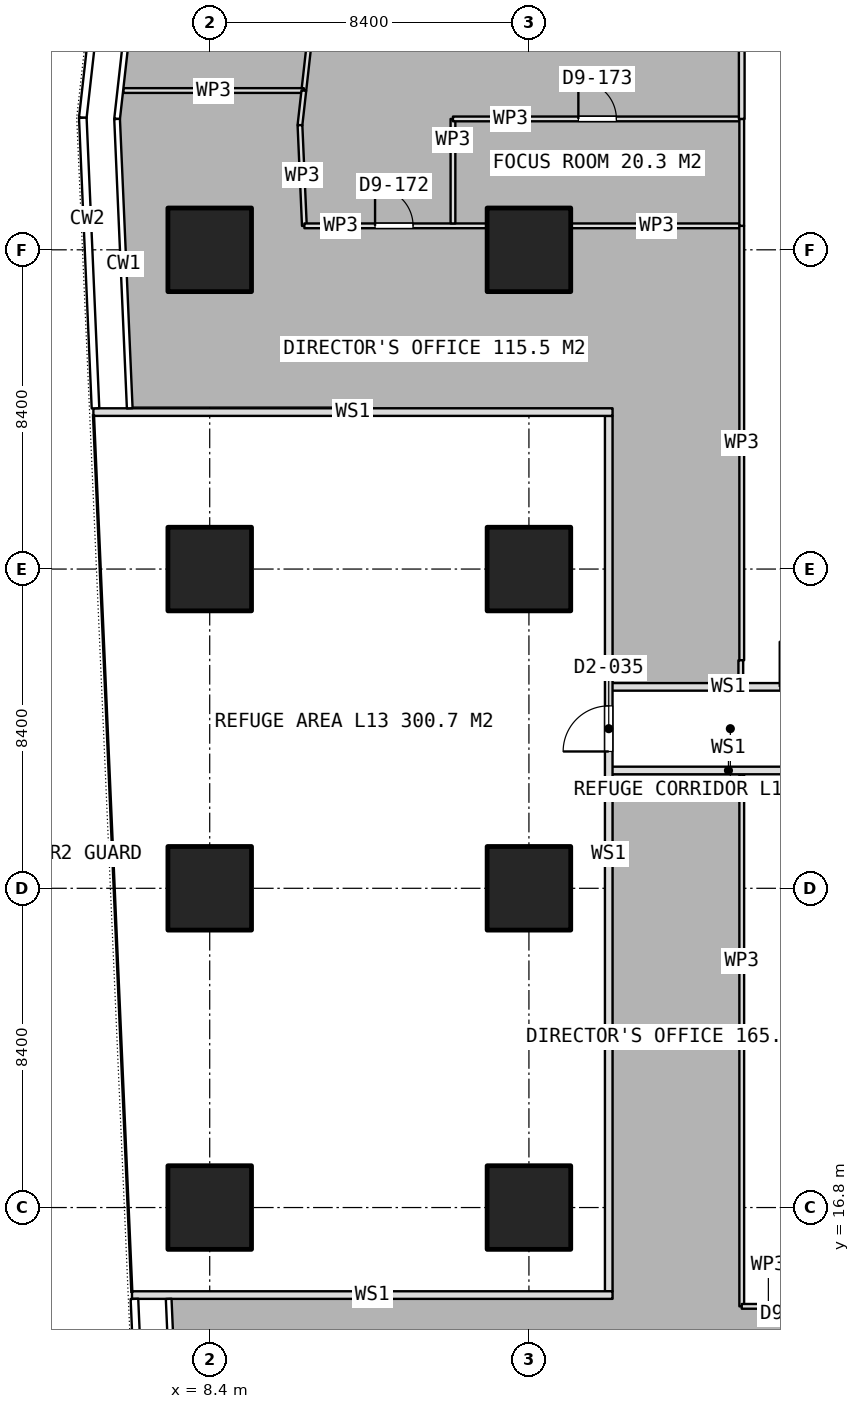
"""IFC4 building model, lengths in metres.
Left out: names, types, materials, properties, quantities, classifications, styles, units other than length and angle.
Written with IfcOpenShell. Run it as: python <this file> out.ifc"""

import sys

from ifc_helpers import new_model, si_unit, direction, frame, frame_2d, origin, origin_2d, place, context, subcontext, project, spatial, rectangle, extrude, element, fill, save


model = new_model("IFC4")
c1 = context("Model", 3, precision=1e-05, world=origin(), true_north=direction((0.0, 1.0)))
c2 = subcontext(c1, "Body", "Model", "MODEL_VIEW")
j1 = project(units=[si_unit("LENGTHUNIT", "METRE"), si_unit("PLANEANGLEUNIT", "RADIAN")], contexts=[c1])
p1 = place(None, origin())
s1 = spatial("IfcSite", under=j1, at=p1, CompositionType="ELEMENT")
p2 = place(p1, origin())
s2 = spatial("IfcBuilding", under=s1, at=p2, CompositionType="ELEMENT")
p3 = place(p2, frame((0.0, 0.0, 55.4)))
s3 = spatial("IfcBuildingStorey", under=s2, at=p3, CompositionType="ELEMENT", Elevation=55.4)
for number, where, z_axis, x_axis in (
    (1, (8.4, 16.8, 0.0), (0.0, 0.0, 1.0), (1.0, 0.0, 0.0)),
    (2, (8.4, 25.2, 0.0), (0.0, 0.0, 1.0), (1.0, 0.0, 0.0)),
    (3, (8.4, 33.6, 0.0), (0.0, 0.0, 1.0), (1.0, 0.0, 0.0)),
    (4, (8.4, 42.0, 0.0), (0.0, 0.0, 1.0), (1.0, 0.0, 0.0)),
    (5, (16.8, 16.8, 0.0), (0.0, 0.0, 1.0), (1.0, 0.0, 0.0)),
    (6, (16.8, 25.2, 0.0), (0.0, 0.0, 1.0), (1.0, 0.0, 0.0)),
    (7, (16.8, 33.6, 0.0), (0.0, 0.0, 1.0), (1.0, 0.0, 0.0)),
    (8, (16.8, 42.0, 0.0), (0.0, 0.0, 1.0), (1.0, 0.0, 0.0)),
):
    element("IfcColumn", number, at=place(p3, frame(where, z_axis=z_axis, x_axis=x_axis)), inside=s3, PredefinedType="COLUMN", context=c2, shape_type="SweptSolid", body=[
        extrude(rectangle(XDim=2.2, YDim=2.2, at=origin_2d()), origin(), (0.0, 0.0, 1.0), 3.75),
    ])
p4 = place(p3, frame((11.99, 56.096, 0.0), z_axis=(0.0, 0.0, 1.0), x_axis=(-0.111668088244, -0.993745560024, 0.0)))
e9 = element("IfcWall", 9, at=p4, inside=s3, PredefinedType="PARTITIONING", context=c2, shape_type="SweptSolid", body=[
    extrude(rectangle(XDim=9.967, YDim=0.125, at=frame_2d((4.984, 0.0))), origin(), (0.0, 0.0, 1.0), 3.5),
])
p5 = place(p4, frame((4.484, 0.0, 0.0)))
e10 = element("IfcOpeningElement", 10, at=p5, cuts=e9, PredefinedType="OPENING", context=c2, shape_type="SweptSolid", body=[
    extrude(rectangle(XDim=1.0, YDim=2.1, at=frame_2d((0.5, 1.05))), frame((0.0, 0.073, 0.0), z_axis=(0.0, -1.0, 0.0), x_axis=(1.0, 0.0, 0.0)), (0.0, 0.0, 1.0), 0.145),
])
p6 = place(p3, frame((10.877, 46.191, 0.0), z_axis=(0.0, 0.0, 1.0), x_axis=(-1.0, 0.0, 0.0)))
e11 = element("IfcWall", 11, at=p6, inside=s3, PredefinedType="PARTITIONING", context=c2, shape_type="SweptSolid", body=[
    extrude(rectangle(XDim=4.75, YDim=0.125, at=frame_2d((2.375, 0.0))), origin(), (0.0, 0.0, 1.0), 3.5),
])
p7 = place(p3, frame((10.877, 46.19, 0.0), z_axis=(0.0, 0.0, 1.0), x_axis=(-0.111455757416, -0.993769396862, 0.0)))
e12 = element("IfcWall", 12, at=p7, inside=s3, PredefinedType="PARTITIONING", context=c2, shape_type="SweptSolid", body=[
    extrude(rectangle(XDim=0.916, YDim=0.125, at=frame_2d((0.458, 0.0))), origin(), (0.0, 0.0, 1.0), 3.5),
])
p8 = place(p3, frame((10.775, 45.28, 0.0), z_axis=(0.0, 0.0, 1.0), x_axis=(0.043828810198, -0.999039055992, 0.0)))
e13 = element("IfcWall", 13, at=p8, inside=s3, PredefinedType="PARTITIONING", context=c2, shape_type="SweptSolid", body=[
    extrude(rectangle(XDim=2.651, YDim=0.125, at=frame_2d((1.326, 0.0))), origin(), (0.0, 0.0, 1.0), 3.5),
])
p9 = place(p3, frame((10.891, 42.631, 0.0), z_axis=(0.0, 0.0, 1.0), x_axis=(1.0, 0.0, 0.0)))
e14 = element("IfcWall", 14, at=p9, inside=s3, PredefinedType="PARTITIONING", context=c2, shape_type="SweptSolid", body=[
    extrude(rectangle(XDim=4.789, YDim=0.125, at=frame_2d((2.395, 0.0))), origin(), (0.0, 0.0, 1.0), 3.5),
])
p10 = place(p9, frame((1.86, 0.0, 0.0)))
e15 = element("IfcOpeningElement", 15, at=p10, cuts=e14, PredefinedType="OPENING", context=c2, shape_type="SweptSolid", body=[
    extrude(rectangle(XDim=1.0, YDim=2.1, at=frame_2d((0.5, 1.05))), frame((0.0, 0.073, 0.0), z_axis=(0.0, -1.0, 0.0), x_axis=(1.0, 0.0, 0.0)), (0.0, 0.0, 1.0), 0.145),
])
p11 = place(p3, frame((17.92, 42.631, 0.0), z_axis=(0.0, 0.0, 1.0), x_axis=(1.0, 0.0, 0.0)))
e16 = element("IfcWall", 16, at=p11, inside=s3, PredefinedType="PARTITIONING", context=c2, shape_type="SweptSolid", body=[
    extrude(rectangle(XDim=4.48, YDim=0.125, at=frame_2d((2.24, 0.0))), origin(), (0.0, 0.0, 1.0), 3.5),
])
p12 = place(p3, frame((22.4, 42.631, 0.0), z_axis=(0.0, 0.0, 1.0), x_axis=(0.0, -1.0, 0.0)))
e17 = element("IfcWall", 17, at=p12, inside=s3, PredefinedType="PARTITIONING", context=c2, shape_type="SweptSolid", body=[
    extrude(rectangle(XDim=11.431, YDim=0.125, at=frame_2d((5.716, 0.0))), origin(), (0.0, 0.0, 1.0), 3.5),
])
p13 = place(p3, frame((22.375, 31.2, 0.0), z_axis=(0.0, 0.0, 1.0), x_axis=(0.0, -1.0, 0.0)))
e18 = element("IfcWall", 18, at=p13, inside=s3, PredefinedType="PARTITIONING", context=c2, shape_type="SweptSolid", body=[
    extrude(rectangle(XDim=0.589, YDim=0.125, at=frame_2d((0.294, 0.0))), origin(), (0.0, 0.0, 1.0), 3.5),
])
p14 = place(p3, frame((14.801, 42.694, 0.0), z_axis=(0.0, 0.0, 1.0), x_axis=(0.0, 1.0, 0.0)))
e19 = element("IfcWall", 19, at=p14, inside=s3, PredefinedType="PARTITIONING", context=c2, shape_type="SweptSolid", body=[
    extrude(rectangle(XDim=2.75, YDim=0.125, at=frame_2d((1.375, 0.0))), origin(), (0.0, 0.0, 1.0), 3.5),
])
p15 = place(p3, frame((14.801, 45.444, 0.0), z_axis=(0.0, 0.0, 1.0), x_axis=(1.0, 0.0, 0.0)))
e20 = element("IfcWall", 20, at=p15, inside=s3, PredefinedType="PARTITIONING", context=c2, shape_type="SweptSolid", body=[
    extrude(rectangle(XDim=7.599, YDim=0.125, at=frame_2d((3.799, 0.0))), origin(), (0.0, 0.0, 1.0), 3.5),
])
p16 = place(p15, frame((3.3, 0.0, 0.0)))
e21 = element("IfcOpeningElement", 21, at=p16, cuts=e20, PredefinedType="OPENING", context=c2, shape_type="SweptSolid", body=[
    extrude(rectangle(XDim=1.0, YDim=2.1, at=frame_2d((0.5, 1.05))), frame((0.0, 0.073, 0.0), z_axis=(0.0, -1.0, 0.0), x_axis=(1.0, 0.0, 0.0)), (0.0, 0.0, 1.0), 0.145),
])
p17 = place(p3, frame((22.4, 45.444, 0.0), z_axis=(0.0, 0.0, 1.0), x_axis=(0.0, -1.0, 0.0)))
e22 = element("IfcWall", 22, at=p17, inside=s3, PredefinedType="PARTITIONING", context=c2, shape_type="SweptSolid", body=[
    extrude(rectangle(XDim=2.813, YDim=0.125, at=frame_2d((1.406, 0.0))), origin(), (0.0, 0.0, 1.0), 3.5),
])
p18 = place(p3, frame((22.4, 53.0, 0.0), z_axis=(0.0, 0.0, 1.0), x_axis=(0.0, -1.0, 0.0)))
e23 = element("IfcWall", 23, at=p18, inside=s3, PredefinedType="PARTITIONING", context=c2, shape_type="SweptSolid", body=[
    extrude(rectangle(XDim=7.556, YDim=0.15, at=frame_2d((3.778, 0.0))), origin(), (0.0, 0.0, 1.0), 3.5),
])
p19 = place(p3, frame((22.4, 28.189, 0.0), z_axis=(0.0, 0.0, 1.0), x_axis=(0.0, -1.0, 0.0)))
e24 = element("IfcWall", 24, at=p19, inside=s3, PredefinedType="PARTITIONING", context=c2, shape_type="SweptSolid", body=[
    extrude(rectangle(XDim=13.989, YDim=0.125, at=frame_2d((6.995, 0.0))), origin(), (0.0, 0.0, 1.0), 3.5),
])
p20 = place(p3, frame((22.4, 14.2, 0.0), z_axis=(0.0, 0.0, 1.0), x_axis=(1.0, 0.0, 0.0)))
e25 = element("IfcWall", 25, at=p20, inside=s3, PredefinedType="PARTITIONING", context=c2, shape_type="SweptSolid", body=[
    extrude(rectangle(XDim=1.401, YDim=0.125, at=frame_2d((0.701, 0.0))), origin(), (0.0, 0.0, 1.0), 3.5),
])
p21 = place(p3, frame((18.9, 14.597, 0.0), z_axis=(0.0, 0.0, 1.0), x_axis=(0.0, 1.0, 0.0)))
e26 = element("IfcWall", 26, at=p21, inside=s3, PredefinedType="PARTITIONING", context=c2, shape_type="SweptSolid", body=[
    extrude(rectangle(XDim=23.033, YDim=0.2, at=frame_2d((11.517, 0.0))), origin(), (0.0, 0.0, 1.0), 3.5),
])
p22 = place(p21, frame((14.203, 0.0, 0.0)))
e27 = element("IfcOpeningElement", 27, at=p22, cuts=e26, PredefinedType="OPENING", context=c2, shape_type="SweptSolid", body=[
    extrude(rectangle(XDim=1.2, YDim=2.1, at=frame_2d((0.6, 1.05))), frame((0.0, 0.11, 0.0), z_axis=(0.0, -1.0, 0.0), x_axis=(1.0, 0.0, 0.0)), (0.0, 0.0, 1.0), 0.22),
])
p23 = place(p3, frame((6.355, 14.497, 0.0), z_axis=(0.0, 0.0, 1.0), x_axis=(1.0, 0.0, 0.0)))
e28 = element("IfcWall", 28, at=p23, inside=s3, PredefinedType="PARTITIONING", context=c2, shape_type="SweptSolid", body=[
    extrude(rectangle(XDim=12.645, YDim=0.2, at=frame_2d((6.323, 0.0))), origin(), (0.0, 0.0, 1.0), 3.5),
])
p24 = place(p3, frame((5.339, 37.73, 0.0), z_axis=(0.0, 0.0, 1.0), x_axis=(1.0, 0.0, 0.0)))
e29 = element("IfcWall", 29, at=p24, inside=s3, PredefinedType="PARTITIONING", context=c2, shape_type="SweptSolid", body=[
    extrude(rectangle(XDim=13.661, YDim=0.2, at=frame_2d((6.831, 0.0))), origin(), (0.0, 0.0, 1.0), 3.5),
])
p25 = place(p3, frame((18.9, 30.5, 0.0), z_axis=(0.0, 0.0, 1.0), x_axis=(1.0, 0.0, 0.0)))
e30 = element("IfcWall", 30, at=p25, inside=s3, PredefinedType="PARTITIONING", context=c2, shape_type="SweptSolid", body=[
    extrude(rectangle(XDim=6.3, YDim=0.2, at=frame_2d((3.15, 0.0))), origin(), (0.0, 0.0, 1.0), 3.5),
])
p26 = place(p25, frame((4.5, 0.0, 0.0)))
e31 = element("IfcOpeningElement", 31, at=p26, cuts=e30, PredefinedType="OPENING", context=c2, shape_type="SweptSolid", body=[
    extrude(rectangle(XDim=1.2, YDim=2.1, at=frame_2d((0.6, 1.05))), frame((0.0, 0.11, 0.0), z_axis=(0.0, -1.0, 0.0), x_axis=(1.0, 0.0, 0.0)), (0.0, 0.0, 1.0), 0.22),
])
p27 = place(p3, frame((18.9, 28.3, 0.0), z_axis=(0.0, 0.0, 1.0), x_axis=(1.0, 0.0, 0.0)))
e32 = element("IfcWall", 32, at=p27, inside=s3, PredefinedType="PARTITIONING", context=c2, shape_type="SweptSolid", body=[
    extrude(rectangle(XDim=6.3, YDim=0.2, at=frame_2d((3.15, 0.0))), origin(), (0.0, 0.0, 1.0), 3.5),
])
p28 = place(p10, origin())
e33 = element("IfcDoor", 33, at=p28, inside=s3, OperationType="SINGLE_SWING_LEFT", PredefinedType="DOOR", context=c2, shape_type="SweptSolid", body=[
    extrude(rectangle(XDim=1.0, YDim=2.1, at=frame_2d((0.5, 1.05))), frame((0.0, 0.025, 0.0), z_axis=(0.0, -1.0, 0.0), x_axis=(1.0, 0.0, 0.0)), (0.0, 0.0, 1.0), 0.05),
])
fill(e15, e33)
p29 = place(p16, origin())
e34 = element("IfcDoor", 34, at=p29, inside=s3, OperationType="SINGLE_SWING_LEFT", PredefinedType="DOOR", context=c2, shape_type="SweptSolid", body=[
    extrude(rectangle(XDim=1.0, YDim=2.1, at=frame_2d((0.5, 1.05))), frame((0.0, 0.025, 0.0), z_axis=(0.0, -1.0, 0.0), x_axis=(1.0, 0.0, 0.0)), (0.0, 0.0, 1.0), 0.05),
])
fill(e21, e34)
p30 = place(p22, origin())
e35 = element("IfcDoor", 35, at=p30, inside=s3, OperationType="SINGLE_SWING_LEFT", PredefinedType="DOOR", context=c2, shape_type="SweptSolid", body=[
    extrude(rectangle(XDim=1.2, YDim=2.1, at=frame_2d((0.6, 1.05))), frame((0.0, 0.025, 0.0), z_axis=(0.0, -1.0, 0.0), x_axis=(1.0, 0.0, 0.0)), (0.0, 0.0, 1.0), 0.05),
])
fill(e27, e35)
save(model, sys.argv[1])
